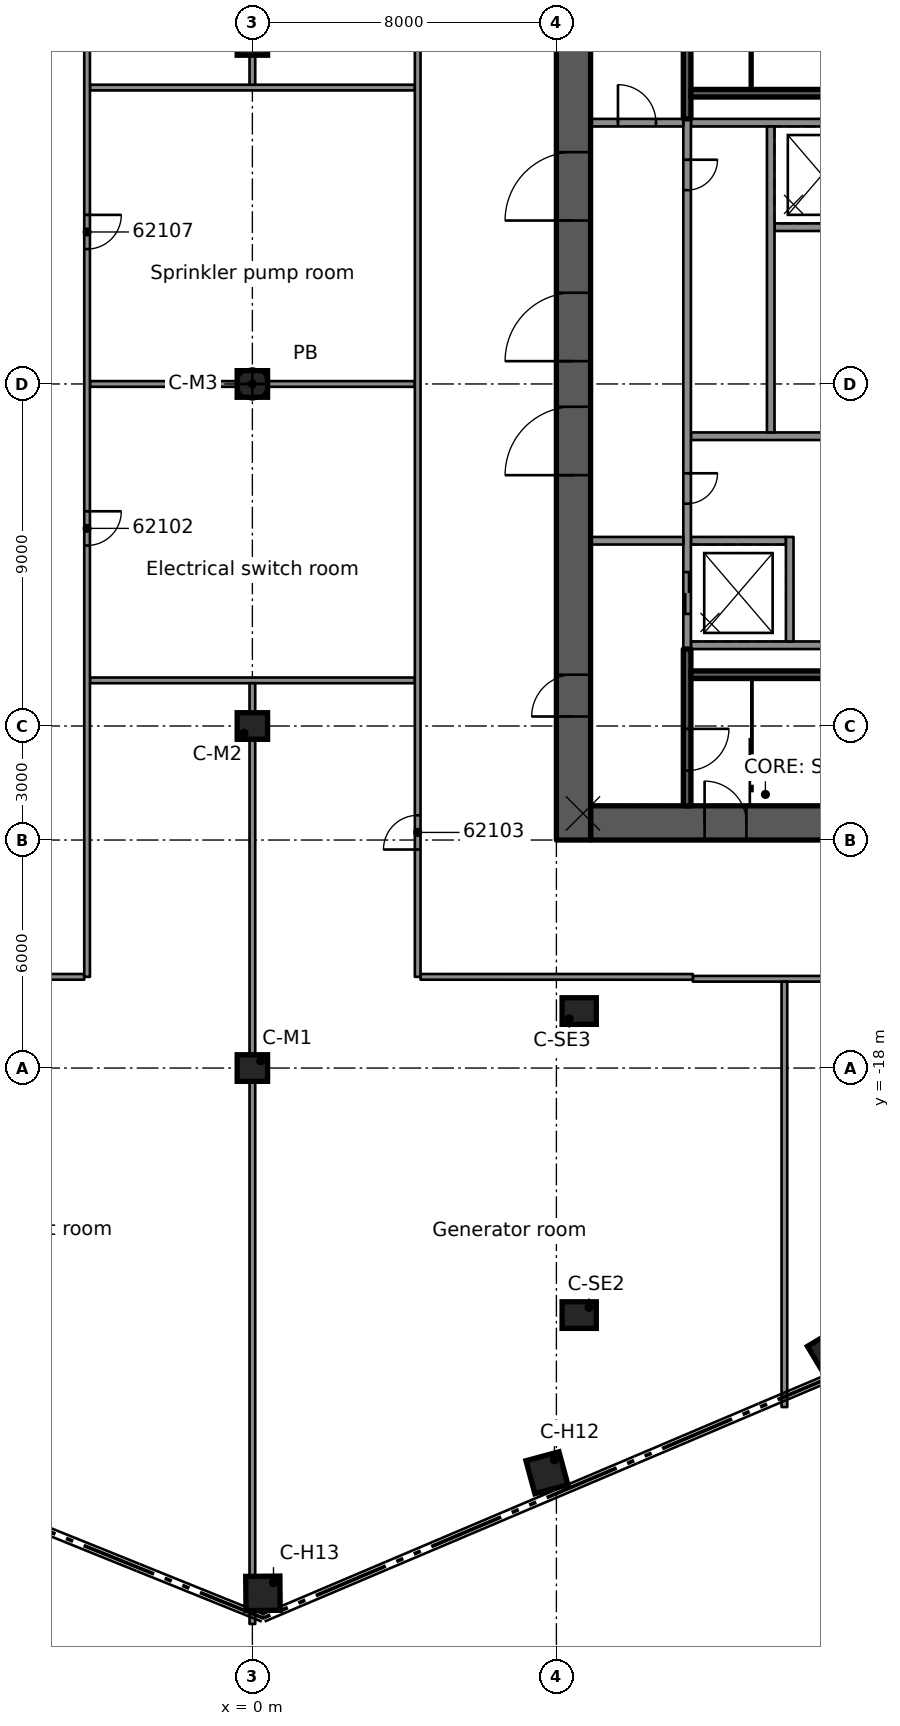
"""IFC4 building model, lengths in metres.
Left out: names, types, materials, properties, quantities, classifications, styles, units other than length and angle.
Written with IfcOpenShell. Run it as: python <this file> out.ifc"""

import sys

from ifc_helpers import new_model, si_unit, direction, frame, frame_2d, origin, origin_2d, place, context, subcontext, project, spatial, rectangle, extrude, element, fill, save


model = new_model("IFC4")
c1 = context("Model", 3, precision=1e-05, world=origin(), true_north=direction((0.0, 1.0)))
c2 = subcontext(c1, "Body", "Model", "MODEL_VIEW")
j1 = project(units=[si_unit("LENGTHUNIT", "METRE"), si_unit("PLANEANGLEUNIT", "RADIAN")], contexts=[c1])
p1 = place(None, origin())
s1 = spatial("IfcSite", under=j1, at=p1, CompositionType="ELEMENT")
p2 = place(p1, origin())
s2 = spatial("IfcBuilding", under=s1, at=p2, CompositionType="ELEMENT")
p3 = place(p2, frame((0.0, 0.0, 299.9)))
s3 = spatial("IfcBuildingStorey", under=s2, at=p3, CompositionType="ELEMENT", Elevation=299.9)
p4 = place(p3, frame((8.9, -11.55, 0.0), z_axis=(0.0, 0.0, 1.0), x_axis=(1.0, 0.0, 0.0)))
e1 = element("IfcWall", 1, at=p4, inside=s3, PredefinedType="SHEAR", context=c2, shape_type="SweptSolid", body=[
    extrude(rectangle(XDim=9.2, YDim=0.9, at=frame_2d((4.6, 0.0))), origin(), (0.0, 0.0, 1.0), 4.4),
])
p5 = place(p4, frame((3.0, 0.0, 0.0)))
e2 = element("IfcOpeningElement", 2, at=p5, cuts=e1, PredefinedType="OPENING", context=c2, shape_type="SweptSolid", body=[
    extrude(rectangle(XDim=1.1, YDim=2.1, at=frame_2d((0.55, 1.05))), frame((0.0, 0.46, 0.0), z_axis=(0.0, -1.0, 0.0), x_axis=(1.0, 0.0, 0.0)), (0.0, 0.0, 1.0), 0.92),
])
p6 = place(p3, frame((8.45, -12.0, 0.0), z_axis=(0.0, 0.0, 1.0), x_axis=(0.0, 1.0, 0.0)))
e3 = element("IfcWall", 3, at=p6, inside=s3, PredefinedType="SHEAR", context=c2, shape_type="SweptSolid", body=[
    extrude(rectangle(XDim=24.0, YDim=0.9, at=frame_2d((12.0, 0.0))), origin(), (0.0, 0.0, 1.0), 4.4),
])
p7 = place(p6, frame((12.6, 0.0, 0.0)))
e4 = element("IfcOpeningElement", 4, at=p7, cuts=e3, PredefinedType="OPENING", context=c2, shape_type="SweptSolid", body=[
    extrude(rectangle(XDim=1.8, YDim=2.1, at=frame_2d((0.9, 1.05))), frame((0.0, 0.46, 0.0), z_axis=(0.0, -1.0, 0.0), x_axis=(1.0, 0.0, 0.0)), (0.0, 0.0, 1.0), 0.92),
])
p8 = place(p6, frame((16.3, 0.0, 0.0)))
e5 = element("IfcOpeningElement", 5, at=p8, cuts=e3, PredefinedType="OPENING", context=c2, shape_type="SweptSolid", body=[
    extrude(rectangle(XDim=1.8, YDim=2.1, at=frame_2d((0.9, 1.05))), frame((0.0, 0.46, 0.0), z_axis=(0.0, -1.0, 0.0), x_axis=(1.0, 0.0, 0.0)), (0.0, 0.0, 1.0), 0.92),
])
p9 = place(p6, frame((9.6, 0.0, 0.0)))
e6 = element("IfcOpeningElement", 6, at=p9, cuts=e3, PredefinedType="OPENING", context=c2, shape_type="SweptSolid", body=[
    extrude(rectangle(XDim=1.8, YDim=2.1, at=frame_2d((0.9, 1.05))), frame((0.0, 0.46, 0.0), z_axis=(0.0, -1.0, 0.0), x_axis=(1.0, 0.0, 0.0)), (0.0, 0.0, 1.0), 0.92),
])
p10 = place(p6, frame((3.25, 0.0, 0.0)))
e7 = element("IfcOpeningElement", 7, at=p10, cuts=e3, PredefinedType="OPENING", context=c2, shape_type="SweptSolid", body=[
    extrude(rectangle(XDim=1.1, YDim=2.1, at=frame_2d((0.55, 1.05))), frame((0.0, 0.46, 0.0), z_axis=(0.0, -1.0, 0.0), x_axis=(1.0, 0.0, 0.0)), (0.0, 0.0, 1.0), 0.92),
])
for number, where, z_axis, x_axis in (
    (8, (15.224, -25.477, 0.0), (0.0, 0.0, 1.0), (0.513, -0.858, 0.0)),
    (9, (7.751, -28.649, 0.0), (0.0, 0.0, 1.0), (0.261, -0.965, 0.0)),
    (10, (0.278, -31.821, 0.0), (0.0, 0.0, 1.0), (0.009, -1.0, 0.0)),
):
    element("IfcColumn", number, at=place(p3, frame(where, z_axis=z_axis, x_axis=x_axis)), inside=s3, PredefinedType="COLUMN", context=c2, shape_type="SweptSolid", body=[
        extrude(rectangle(XDim=0.9, YDim=0.9, at=origin_2d()), origin(), (0.0, 0.0, 1.0), 4.4),
    ])
for number, where, z_axis, x_axis in (
    (11, (0.0, -18.0, 0.0), (0.0, 0.0, 1.0), (1.0, 0.0, 0.0)),
    (12, (0.0, -9.0, 0.0), (0.0, 0.0, 1.0), (1.0, 0.0, 0.0)),
    (13, (0.0, 0.0, 0.0), (0.0, 0.0, 1.0), (1.0, 0.0, 0.0)),
    (14, (0.0, 9.0, 0.0), (0.0, 0.0, 1.0), (1.0, 0.0, 0.0)),
):
    element("IfcColumn", number, at=place(p3, frame(where, z_axis=z_axis, x_axis=x_axis)), inside=s3, PredefinedType="COLUMN", context=c2, shape_type="SweptSolid", body=[
        extrude(rectangle(XDim=0.8, YDim=0.7, at=origin_2d()), origin(), (0.0, 0.0, 1.0), 4.4),
    ])
for number, where, z_axis, x_axis in (
    (15, (8.6, -24.5, 0.0), (0.0, 0.0, 1.0), (1.0, 0.0, 0.0)),
    (16, (8.6, -16.5, 0.0), (0.0, 0.0, 1.0), (1.0, 0.0, 0.0)),
):
    element("IfcColumn", number, at=place(p3, frame(where, z_axis=z_axis, x_axis=x_axis)), inside=s3, PredefinedType="COLUMN", context=c2, shape_type="SweptSolid", body=[
        extrude(rectangle(XDim=0.9, YDim=0.7, at=origin_2d()), origin(), (0.0, 0.0, 1.0), 4.4),
    ])
for number, where, z_axis, x_axis in (
    (17, (11.54, -6.875, 0.0), (0.0, 0.0, 1.0), (1.0, 0.0, 0.0)),
    (18, (11.54, 6.875, 0.0), (0.0, 0.0, 1.0), (1.0, 0.0, 0.0)),
):
    element("IfcWall", number, at=place(p3, frame(where, z_axis=z_axis, x_axis=x_axis)), inside=s3, PredefinedType="SOLIDWALL", context=c2, shape_type="SweptSolid", body=[
        extrude(rectangle(XDim=6.56, YDim=0.2, at=frame_2d((3.28, 0.0))), origin(), (0.0, 0.0, 1.0), 3.98),
    ])
p11 = place(p3, frame((13.74, 4.125, 0.0), z_axis=(0.0, 0.0, 1.0), x_axis=(1.0, 0.0, 0.0)))
e19 = element("IfcWall", 19, at=p11, inside=s3, PredefinedType="SOLIDWALL", context=c2, shape_type="SweptSolid", body=[
    extrude(rectangle(XDim=2.5, YDim=0.2, at=frame_2d((1.25, 0.0))), origin(), (0.0, 0.0, 1.0), 3.98),
])
p12 = place(p3, frame((11.54, -1.375, 0.0), z_axis=(0.0, 0.0, 1.0), x_axis=(1.0, 0.0, 0.0)))
e20 = element("IfcWall", 20, at=p12, inside=s3, PredefinedType="SOLIDWALL", context=c2, shape_type="SweptSolid", body=[
    extrude(rectangle(XDim=4.2, YDim=0.2, at=frame_2d((2.1, 0.0))), origin(), (0.0, 0.0, 1.0), 3.98),
])
p13 = place(p3, frame((11.54, -4.125, 0.0), z_axis=(0.0, 0.0, 1.0), x_axis=(1.0, 0.0, 0.0)))
e21 = element("IfcWall", 21, at=p13, inside=s3, PredefinedType="SOLIDWALL", context=c2, shape_type="SweptSolid", body=[
    extrude(rectangle(XDim=2.5, YDim=0.2, at=frame_2d((1.25, 0.0))), origin(), (0.0, 0.0, 1.0), 3.98),
])
p14 = place(p3, frame((11.44, 6.975, 0.0), z_axis=(0.0, 0.0, 1.0), x_axis=(0.0, -1.0, 0.0)))
e22 = element("IfcWall", 22, at=p14, inside=s3, PredefinedType="SOLIDWALL", context=c2, shape_type="SweptSolid", body=[
    extrude(rectangle(XDim=13.95, YDim=0.2, at=frame_2d((6.975, 0.0))), origin(), (0.0, 0.0, 1.0), 3.98),
])
p15 = place(p14, frame((11.925, 0.0, 0.0)))
e23 = element("IfcOpeningElement", 23, at=p15, cuts=e22, PredefinedType="OPENING", context=c2, shape_type="SweptSolid", body=[
    extrude(rectangle(XDim=1.1, YDim=2.1, at=frame_2d((0.55, 1.05))), frame((0.0, 0.11, 0.0), z_axis=(0.0, -1.0, 0.0), x_axis=(1.0, 0.0, 0.0)), (0.0, 0.0, 1.0), 0.22),
])
p16 = place(p14, frame((1.075, 0.0, 0.0)))
e24 = element("IfcOpeningElement", 24, at=p16, cuts=e22, PredefinedType="OPENING", context=c2, shape_type="SweptSolid", body=[
    extrude(rectangle(XDim=0.8, YDim=2.1, at=frame_2d((0.4, 1.05))), frame((0.0, 0.11, 0.0), z_axis=(0.0, -1.0, 0.0), x_axis=(1.0, 0.0, 0.0)), (0.0, 0.0, 1.0), 0.22),
])
p17 = place(p14, frame((9.325, 0.0, 0.0)))
e25 = element("IfcOpeningElement", 25, at=p17, cuts=e22, PredefinedType="OPENING", context=c2, shape_type="SweptSolid", body=[
    extrude(rectangle(XDim=0.8, YDim=2.1, at=frame_2d((0.4, 1.05))), frame((0.0, 0.11, 0.0), z_axis=(0.0, -1.0, 0.0), x_axis=(1.0, 0.0, 0.0)), (0.0, 0.0, 1.0), 0.22),
])
p18 = place(p3, frame((13.64, 6.775, 0.0), z_axis=(0.0, 0.0, 1.0), x_axis=(0.0, -1.0, 0.0)))
e26 = element("IfcWall", 26, at=p18, inside=s3, PredefinedType="SOLIDWALL", context=c2, shape_type="SweptSolid", body=[
    extrude(rectangle(XDim=8.05, YDim=0.2, at=frame_2d((4.025, 0.0))), origin(), (0.0, 0.0, 1.0), 3.98),
])
p19 = place(p3, frame((14.14, -4.025, 0.0), z_axis=(0.0, 0.0, 1.0), x_axis=(0.0, -1.0, 0.0)))
e27 = element("IfcWall", 27, at=p19, inside=s3, PredefinedType="SOLIDWALL", context=c2, shape_type="SweptSolid", body=[
    extrude(rectangle(XDim=2.75, YDim=0.2, at=frame_2d((1.375, 0.0))), origin(), (0.0, 0.0, 1.0), 3.98),
])
p20 = place(p3, frame((11.44, -6.975, 0.0), z_axis=(0.0, 0.0, 1.0), x_axis=(0.0, -1.0, 0.0)))
e28 = element("IfcWall", 28, at=p20, inside=s3, PredefinedType="SOLIDWALL", context=c2, shape_type="SweptSolid", body=[
    extrude(rectangle(XDim=4.125, YDim=0.2, at=frame_2d((2.062, 0.0))), origin(), (0.0, 0.0, 1.0), 3.98),
])
p21 = place(p20, frame((2.1, 0.0, 0.0)))
e29 = element("IfcOpeningElement", 29, at=p21, cuts=e28, PredefinedType="OPENING", context=c2, shape_type="SweptSolid", body=[
    extrude(rectangle(XDim=1.1, YDim=2.1, at=frame_2d((0.55, 1.05))), frame((0.0, 0.11, 0.0), z_axis=(0.0, -1.0, 0.0), x_axis=(1.0, 0.0, 0.0)), (0.0, 0.0, 1.0), 0.22),
])
p22 = place(p3, frame((11.54, -7.65, 0.0), z_axis=(0.0, 0.0, 1.0), x_axis=(1.0, 0.0, 0.0)))
e30 = element("IfcWall", 30, at=p22, inside=s3, PredefinedType="SOLIDWALL", context=c2, shape_type="SweptSolid", body=[
    extrude(rectangle(XDim=6.56, YDim=0.2, at=frame_2d((3.28, 0.0))), origin(), (0.0, 0.0, 1.0), 3.98),
])
p23 = place(p3, frame((11.44, 11.1, 0.0), z_axis=(0.0, 0.0, 1.0), x_axis=(0.0, -1.0, 0.0)))
e31 = element("IfcWall", 31, at=p23, inside=s3, PredefinedType="SOLIDWALL", context=c2, shape_type="SweptSolid", body=[
    extrude(rectangle(XDim=4.125, YDim=0.2, at=frame_2d((2.062, 0.0))), origin(), (0.0, 0.0, 1.0), 3.98),
])
p24 = place(p3, frame((11.54, 7.65, 0.0), z_axis=(0.0, 0.0, 1.0), x_axis=(1.0, 0.0, 0.0)))
e32 = element("IfcWall", 32, at=p24, inside=s3, PredefinedType="SOLIDWALL", context=c2, shape_type="SweptSolid", body=[
    extrude(rectangle(XDim=6.56, YDim=0.2, at=frame_2d((3.28, 0.0))), origin(), (0.0, 0.0, 1.0), 3.98),
])
p25 = place(p3, frame((8.9, -4.125, 0.0), z_axis=(0.0, 0.0, 1.0), x_axis=(1.0, 0.0, 0.0)))
e33 = element("IfcWall", 33, at=p25, inside=s3, PredefinedType="PARTITIONING", context=c2, shape_type="SweptSolid", body=[
    extrude(rectangle(XDim=2.44, YDim=0.2, at=frame_2d((1.22, 0.0))), origin(), (0.0, 0.0, 1.0), 3.98),
])
p26 = place(p3, frame((8.9, 6.875, 0.0), z_axis=(0.0, 0.0, 1.0), x_axis=(1.0, 0.0, 0.0)))
e34 = element("IfcWall", 34, at=p26, inside=s3, PredefinedType="PARTITIONING", context=c2, shape_type="SweptSolid", body=[
    extrude(rectangle(XDim=2.44, YDim=0.2, at=frame_2d((1.22, 0.0))), origin(), (0.0, 0.0, 1.0), 3.98),
])
p27 = place(p26, frame((0.72, 0.0, 0.0)))
e35 = element("IfcOpeningElement", 35, at=p27, cuts=e34, PredefinedType="OPENING", context=c2, shape_type="SweptSolid", body=[
    extrude(rectangle(XDim=1.0, YDim=2.1, at=frame_2d((0.5, 1.05))), frame((0.0, 0.11, 0.0), z_axis=(0.0, -1.0, 0.0), x_axis=(1.0, 0.0, 0.0)), (0.0, 0.0, 1.0), 0.22),
])
p28 = place(p3, frame((11.591, -15.651, 0.0), z_axis=(0.0, 0.0, 1.0), x_axis=(1.0, 0.0, 0.0)))
e36 = element("IfcWall", 36, at=p28, inside=s3, PredefinedType="PARTITIONING", context=c2, shape_type="SweptSolid", body=[
    extrude(rectangle(XDim=10.984, YDim=0.15, at=frame_2d((5.492, 0.0))), origin(), (0.0, 0.0, 1.0), 3.98),
])
p29 = place(p3, frame((-4.424, -15.6, 0.0), z_axis=(0.0, 0.0, 1.0), x_axis=(-1.0, 0.0, 0.0)))
e37 = element("IfcWall", 37, at=p29, inside=s3, PredefinedType="PARTITIONING", context=c2, shape_type="SweptSolid", body=[
    extrude(rectangle(XDim=7.176, YDim=0.15, at=frame_2d((3.588, 0.0))), origin(), (0.0, 0.0, 1.0), 3.98),
])
p30 = place(p29, frame((3.025, 0.0, 0.0)))
e38 = element("IfcOpeningElement", 38, at=p30, cuts=e37, PredefinedType="OPENING", context=c2, shape_type="SweptSolid", body=[
    extrude(rectangle(XDim=0.9, YDim=2.1, at=frame_2d((0.45, 1.05))), frame((0.0, 0.085, 0.0), z_axis=(0.0, -1.0, 0.0), x_axis=(1.0, 0.0, 0.0)), (0.0, 0.0, 1.0), 0.17),
])
p31 = place(p3, frame((4.425, -15.6, 0.0), z_axis=(0.0, 0.0, 1.0), x_axis=(0.999999990712, -0.000136295487, 0.0)))
e39 = element("IfcWall", 39, at=p31, inside=s3, PredefinedType="PARTITIONING", context=c2, shape_type="SweptSolid", body=[
    extrude(rectangle(XDim=7.165, YDim=0.15, at=frame_2d((3.583, 0.0))), origin(), (0.0, 0.0, 1.0), 3.98),
])
for number, where, z_axis, x_axis in (
    (40, (-4.274, -7.799, 0.0), (0.0, 0.0, 1.0), (1.0, 0.0, 0.0)),
    (41, (-4.274, 0.0, 0.0), (0.0, 0.0, 1.0), (1.0, 0.0, 0.0)),
    (42, (-4.274, 7.799, 0.0), (0.0, 0.0, 1.0), (1.0, 0.0, 0.0)),
):
    element("IfcWall", number, at=place(p3, frame(where, z_axis=z_axis, x_axis=x_axis)), inside=s3, PredefinedType="PARTITIONING", context=c2, shape_type="SweptSolid", body=[
        extrude(rectangle(XDim=8.549, YDim=0.15, at=frame_2d((4.274, 0.0))), origin(), (0.0, 0.0, 1.0), 3.98),
    ])
p32 = place(p3, frame((14.0, -26.92, 0.0), z_axis=(0.0, 0.0, 1.0), x_axis=(0.0, 1.0, 0.0)))
e43 = element("IfcWall", 43, at=p32, inside=s3, PredefinedType="PARTITIONING", context=c2, shape_type="SweptSolid", body=[
    extrude(rectangle(XDim=11.194, YDim=0.15, at=frame_2d((5.597, 0.0))), origin(), (0.0, 0.0, 1.0), 3.98),
])
p33 = place(p3, frame((4.35, -15.6, 0.0), z_axis=(0.0, 0.0, 1.0), x_axis=(0.0, 1.0, 0.0)))
e44 = element("IfcWall", 44, at=p33, inside=s3, PredefinedType="PARTITIONING", context=c2, shape_type="SweptSolid", body=[
    extrude(rectangle(XDim=31.201, YDim=0.15, at=frame_2d((15.601, 0.0))), origin(), (0.0, 0.0, 1.0), 3.98),
])
p34 = place(p33, frame((3.35, 0.0, 0.0)))
e45 = element("IfcOpeningElement", 45, at=p34, cuts=e44, PredefinedType="OPENING", context=c2, shape_type="SweptSolid", body=[
    extrude(rectangle(XDim=0.9, YDim=2.1, at=frame_2d((0.45, 1.05))), frame((0.0, 0.085, 0.0), z_axis=(0.0, -1.0, 0.0), x_axis=(1.0, 0.0, 0.0)), (0.0, 0.0, 1.0), 0.17),
])
for number, where, z_axis, x_axis in (
    (46, (0.0, -32.627, 0.0), (0.0, 0.0, 1.0), (0.0, 1.0, 0.0)),
    (47, (0.0, 7.874, 0.0), (0.0, 0.0, 1.0), (0.0, 1.0, 0.0)),
):
    element("IfcWall", number, at=place(p3, frame(where, z_axis=z_axis, x_axis=x_axis)), inside=s3, PredefinedType="PARTITIONING", context=c2, shape_type="SweptSolid", body=[
        extrude(rectangle(XDim=24.753, YDim=0.15, at=frame_2d((12.376, 0.0))), origin(), (0.0, 0.0, 1.0), 3.98),
    ])
p35 = place(p3, frame((-4.349, 15.6, 0.0), z_axis=(0.0, 0.0, 1.0), x_axis=(0.0, -1.0, 0.0)))
e48 = element("IfcWall", 48, at=p35, inside=s3, PredefinedType="PARTITIONING", context=c2, shape_type="SweptSolid", body=[
    extrude(rectangle(XDim=31.2, YDim=0.15, at=frame_2d((15.6, 0.0))), origin(), (0.0, 0.0, 1.0), 3.98),
])
p36 = place(p35, frame((18.95, 0.0, 0.0)))
e49 = element("IfcOpeningElement", 49, at=p36, cuts=e48, PredefinedType="OPENING", context=c2, shape_type="SweptSolid", body=[
    extrude(rectangle(XDim=0.9, YDim=2.1, at=frame_2d((0.45, 1.05))), frame((0.0, 0.085, 0.0), z_axis=(0.0, -1.0, 0.0), x_axis=(1.0, 0.0, 0.0)), (0.0, 0.0, 1.0), 0.17),
])
p37 = place(p35, frame((11.151, 0.0, 0.0)))
e50 = element("IfcOpeningElement", 50, at=p37, cuts=e48, PredefinedType="OPENING", context=c2, shape_type="SweptSolid", body=[
    extrude(rectangle(XDim=0.9, YDim=2.1, at=frame_2d((0.45, 1.05))), frame((0.0, 0.085, 0.0), z_axis=(0.0, -1.0, 0.0), x_axis=(1.0, 0.0, 0.0)), (0.0, 0.0, 1.0), 0.17),
])
p38 = place(p35, frame((3.35, 0.0, 0.0)))
e51 = element("IfcOpeningElement", 51, at=p38, cuts=e48, PredefinedType="OPENING", context=c2, shape_type="SweptSolid", body=[
    extrude(rectangle(XDim=0.9, YDim=2.1, at=frame_2d((0.45, 1.05))), frame((0.0, 0.085, 0.0), z_axis=(0.0, -1.0, 0.0), x_axis=(1.0, 0.0, 0.0)), (0.0, 0.0, 1.0), 0.17),
])
p39 = place(p15, origin())
e52 = element("IfcDoor", 52, at=p39, inside=s3, OperationType="DOUBLE_DOOR_SLIDING", PredefinedType="DOOR", context=c2, shape_type="SweptSolid", body=[
    extrude(rectangle(XDim=1.1, YDim=2.1, at=frame_2d((0.55, 1.05))), frame((0.0, 0.025, 0.0), z_axis=(0.0, -1.0, 0.0), x_axis=(1.0, 0.0, 0.0)), (0.0, 0.0, 1.0), 0.05),
])
fill(e23, e52)
p40 = place(p16, origin())
e53 = element("IfcDoor", 53, at=p40, inside=s3, OperationType="SINGLE_SWING_LEFT", PredefinedType="DOOR", context=c2, shape_type="SweptSolid", body=[
    extrude(rectangle(XDim=0.8, YDim=2.1, at=frame_2d((0.4, 1.05))), frame((0.0, 0.025, 0.0), z_axis=(0.0, -1.0, 0.0), x_axis=(1.0, 0.0, 0.0)), (0.0, 0.0, 1.0), 0.05),
])
fill(e24, e53)
p41 = place(p17, origin())
e54 = element("IfcDoor", 54, at=p41, inside=s3, OperationType="SINGLE_SWING_LEFT", PredefinedType="DOOR", context=c2, shape_type="SweptSolid", body=[
    extrude(rectangle(XDim=0.8, YDim=2.1, at=frame_2d((0.4, 1.05))), frame((0.0, 0.025, 0.0), z_axis=(0.0, -1.0, 0.0), x_axis=(1.0, 0.0, 0.0)), (0.0, 0.0, 1.0), 0.05),
])
fill(e25, e54)
p42 = place(p7, origin())
e55 = element("IfcDoor", 55, at=p42, inside=s3, OperationType="SINGLE_SWING_RIGHT", PredefinedType="DOOR", context=c2, shape_type="SweptSolid", body=[
    extrude(rectangle(XDim=1.8, YDim=2.1, at=frame_2d((0.9, 1.05))), frame((0.0, 0.025, 0.0), z_axis=(0.0, -1.0, 0.0), x_axis=(1.0, 0.0, 0.0)), (0.0, 0.0, 1.0), 0.05),
])
fill(e4, e55)
p43 = place(p8, origin())
e56 = element("IfcDoor", 56, at=p43, inside=s3, OperationType="SINGLE_SWING_RIGHT", PredefinedType="DOOR", context=c2, shape_type="SweptSolid", body=[
    extrude(rectangle(XDim=1.8, YDim=2.1, at=frame_2d((0.9, 1.05))), frame((0.0, 0.025, 0.0), z_axis=(0.0, -1.0, 0.0), x_axis=(1.0, 0.0, 0.0)), (0.0, 0.0, 1.0), 0.05),
])
fill(e5, e56)
p44 = place(p9, origin())
e57 = element("IfcDoor", 57, at=p44, inside=s3, OperationType="SINGLE_SWING_LEFT", PredefinedType="DOOR", context=c2, shape_type="SweptSolid", body=[
    extrude(rectangle(XDim=1.8, YDim=2.1, at=frame_2d((0.9, 1.05))), frame((0.0, 0.025, 0.0), z_axis=(0.0, -1.0, 0.0), x_axis=(1.0, 0.0, 0.0)), (0.0, 0.0, 1.0), 0.05),
])
fill(e6, e57)
p45 = place(p10, origin())
e58 = element("IfcDoor", 58, at=p45, inside=s3, OperationType="SINGLE_SWING_LEFT", PredefinedType="DOOR", context=c2, shape_type="SweptSolid", body=[
    extrude(rectangle(XDim=1.1, YDim=2.1, at=frame_2d((0.55, 1.05))), frame((0.0, 0.025, 0.0), z_axis=(0.0, -1.0, 0.0), x_axis=(1.0, 0.0, 0.0)), (0.0, 0.0, 1.0), 0.05),
])
fill(e7, e58)
p46 = place(p5, origin())
e59 = element("IfcDoor", 59, at=p46, inside=s3, OperationType="SINGLE_SWING_LEFT", PredefinedType="DOOR", context=c2, shape_type="SweptSolid", body=[
    extrude(rectangle(XDim=1.1, YDim=2.1, at=frame_2d((0.55, 1.05))), frame((0.0, 0.025, 0.0), z_axis=(0.0, -1.0, 0.0), x_axis=(1.0, 0.0, 0.0)), (0.0, 0.0, 1.0), 0.05),
])
fill(e2, e59)
p47 = place(p21, origin())
e60 = element("IfcDoor", 60, at=p47, inside=s3, OperationType="SINGLE_SWING_RIGHT", PredefinedType="DOOR", context=c2, shape_type="SweptSolid", body=[
    extrude(rectangle(XDim=1.1, YDim=2.1, at=frame_2d((0.55, 1.05))), frame((0.0, 0.025, 0.0), z_axis=(0.0, -1.0, 0.0), x_axis=(1.0, 0.0, 0.0)), (0.0, 0.0, 1.0), 0.05),
])
fill(e29, e60)
p48 = place(p27, origin())
e61 = element("IfcDoor", 61, at=p48, inside=s3, OperationType="SINGLE_SWING_RIGHT", PredefinedType="DOOR", context=c2, shape_type="SweptSolid", body=[
    extrude(rectangle(XDim=1.0, YDim=2.1, at=frame_2d((0.5, 1.05))), frame((0.0, 0.025, 0.0), z_axis=(0.0, -1.0, 0.0), x_axis=(1.0, 0.0, 0.0)), (0.0, 0.0, 1.0), 0.05),
])
fill(e35, e61)
p49 = place(p36, origin())
e62 = element("IfcDoor", 62, at=p49, inside=s3, OperationType="SINGLE_SWING_RIGHT", PredefinedType="DOOR", context=c2, shape_type="SweptSolid", body=[
    extrude(rectangle(XDim=0.9, YDim=2.1, at=frame_2d((0.45, 1.05))), frame((0.0, 0.025, 0.0), z_axis=(0.0, -1.0, 0.0), x_axis=(1.0, 0.0, 0.0)), (0.0, 0.0, 1.0), 0.05),
])
fill(e49, e62)
p50 = place(p34, origin())
e63 = element("IfcDoor", 63, at=p50, inside=s3, OperationType="SINGLE_SWING_LEFT", PredefinedType="DOOR", context=c2, shape_type="SweptSolid", body=[
    extrude(rectangle(XDim=0.9, YDim=2.1, at=frame_2d((0.45, 1.05))), frame((0.0, 0.025, 0.0), z_axis=(0.0, -1.0, 0.0), x_axis=(1.0, 0.0, 0.0)), (0.0, 0.0, 1.0), 0.05),
])
fill(e45, e63)
p51 = place(p37, origin())
e64 = element("IfcDoor", 64, at=p51, inside=s3, OperationType="SINGLE_SWING_LEFT", PredefinedType="DOOR", context=c2, shape_type="SweptSolid", body=[
    extrude(rectangle(XDim=0.9, YDim=2.1, at=frame_2d((0.45, 1.05))), frame((0.0, 0.025, 0.0), z_axis=(0.0, -1.0, 0.0), x_axis=(1.0, 0.0, 0.0)), (0.0, 0.0, 1.0), 0.05),
])
fill(e50, e64)
save(model, sys.argv[1])
